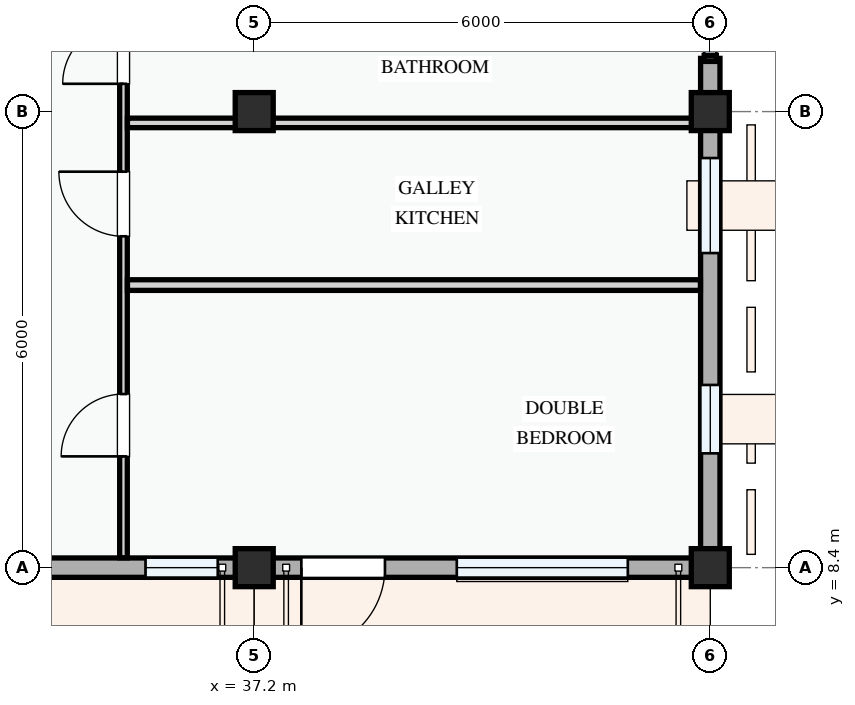
"""IFC4 building model, lengths in metres.
Left out: names, types, materials, properties, quantities, classifications, styles, units other than length and angle.
Written with IfcOpenShell. Run it as: python <this file> out.ifc"""

import sys

from ifc_helpers import new_model, si_unit, direction, frame, frame_2d, origin, origin_2d, place, context, subcontext, project, spatial, rectangle, extrude, element, fill, save


model = new_model("IFC4")
c1 = context("Model", 3, precision=1e-05, world=origin(), true_north=direction((0.0, 1.0)))
c2 = subcontext(c1, "Body", "Model", "MODEL_VIEW")
j1 = project(units=[si_unit("LENGTHUNIT", "METRE"), si_unit("PLANEANGLEUNIT", "RADIAN")], contexts=[c1])
p1 = place(None, origin())
s1 = spatial("IfcSite", under=j1, at=p1, CompositionType="ELEMENT")
p2 = place(p1, origin())
s2 = spatial("IfcBuilding", under=s1, at=p2, CompositionType="ELEMENT")
p3 = place(p2, frame((0.0, 0.0, 31.2)))
s3 = spatial("IfcBuildingStorey", under=s2, at=p3, CompositionType="ELEMENT", Elevation=31.2)
for number, where, z_axis, x_axis in (
    (1, (37.2, 8.4, 0.0), (0.0, 0.0, 1.0), (1.0, 0.0, 0.0)),
    (2, (37.2, 14.4, 0.0), (0.0, 0.0, 1.0), (1.0, 0.0, 0.0)),
    (3, (43.2, 8.4, 0.0), (0.0, 0.0, 1.0), (1.0, 0.0, 0.0)),
    (4, (43.2, 14.4, 0.0), (0.0, 0.0, 1.0), (1.0, 0.0, 0.0)),
):
    element("IfcColumn", number, at=place(p3, frame(where, z_axis=z_axis, x_axis=x_axis)), inside=s3, PredefinedType="COLUMN", context=c2, shape_type="SweptSolid", body=[
        extrude(rectangle(XDim=0.5, YDim=0.5, at=origin_2d()), origin(), (0.0, 0.0, 1.0), 3.3),
    ])
p4 = place(p3, frame((28.8, 8.4, 0.0), z_axis=(0.0, 0.0, 1.0), x_axis=(1.0, 0.0, 0.0)))
e5 = element("IfcWall", 5, at=p4, inside=s3, PredefinedType="STANDARD", context=c2, shape_type="SweptSolid", body=[
    extrude(rectangle(XDim=8.4, YDim=0.255, at=frame_2d((4.2, 0.0))), origin(), (0.0, 0.0, 1.0), 2.375),
])
p5 = place(p4, frame((2.15, 0.0, 0.0)))
e6 = element("IfcOpeningElement", 6, at=p5, cuts=e5, PredefinedType="OPENING", context=c2, shape_type="SweptSolid", body=[
    extrude(rectangle(XDim=1.05, YDim=2.15, at=frame_2d((0.525, 1.075))), frame((0.0, 0.137, 0.0), z_axis=(0.0, -1.0, 0.0), x_axis=(1.0, 0.0, 0.0)), (0.0, 0.0, 1.0), 0.275),
])
p6 = place(p4, frame((0.505, 0.0, 0.78)))
e7 = element("IfcOpeningElement", 7, at=p6, cuts=e5, PredefinedType="OPENING", context=c2, shape_type="SweptSolid", body=[
    extrude(rectangle(XDim=1.0, YDim=1.25, at=frame_2d((0.5, 0.625))), frame((0.0, 0.137, 0.0), z_axis=(0.0, -1.0, 0.0), x_axis=(1.0, 0.0, 0.0)), (0.0, 0.0, 1.0), 0.275),
])
p7 = place(p4, frame((4.265, 0.0, 0.78)))
e8 = element("IfcOpeningElement", 8, at=p7, cuts=e5, PredefinedType="OPENING", context=c2, shape_type="SweptSolid", body=[
    extrude(rectangle(XDim=1.4, YDim=1.45, at=frame_2d((0.7, 0.725))), frame((0.0, 0.137, 0.0), z_axis=(0.0, -1.0, 0.0), x_axis=(1.0, 0.0, 0.0)), (0.0, 0.0, 1.0), 0.275),
])
p8 = place(p4, frame((6.97, 0.0, 0.78)))
e9 = element("IfcOpeningElement", 9, at=p8, cuts=e5, PredefinedType="OPENING", context=c2, shape_type="SweptSolid", body=[
    extrude(rectangle(XDim=0.95, YDim=1.15, at=frame_2d((0.475, 0.575))), frame((0.0, 0.137, 0.0), z_axis=(0.0, -1.0, 0.0), x_axis=(1.0, 0.0, 0.0)), (0.0, 0.0, 1.0), 0.275),
])
p9 = place(p3, frame((37.2, 8.4, 0.0), z_axis=(0.0, 0.0, 1.0), x_axis=(1.0, 0.0, 0.0)))
e10 = element("IfcWall", 10, at=p9, inside=s3, PredefinedType="STANDARD", context=c2, shape_type="SweptSolid", body=[
    extrude(rectangle(XDim=6.0, YDim=0.255, at=frame_2d((3.0, 0.0))), origin(), (0.0, 0.0, 1.0), 2.525),
])
p10 = place(p9, frame((0.62, 0.0, 0.0)))
e11 = element("IfcOpeningElement", 11, at=p10, cuts=e10, PredefinedType="OPENING", context=c2, shape_type="SweptSolid", body=[
    extrude(rectangle(XDim=1.1, YDim=2.15, at=frame_2d((0.55, 1.075))), frame((0.0, 0.137, 0.0), z_axis=(0.0, -1.0, 0.0), x_axis=(1.0, 0.0, 0.0)), (0.0, 0.0, 1.0), 0.275),
])
p11 = place(p9, frame((2.665, 0.0, 0.78)))
e12 = element("IfcOpeningElement", 12, at=p11, cuts=e10, PredefinedType="OPENING", context=c2, shape_type="SweptSolid", body=[
    extrude(rectangle(XDim=2.25, YDim=1.6, at=frame_2d((1.125, 0.8))), frame((0.0, 0.137, 0.0), z_axis=(0.0, -1.0, 0.0), x_axis=(1.0, 0.0, 0.0)), (0.0, 0.0, 1.0), 0.275),
])
p12 = place(p3, frame((43.2, 8.4, 0.0), z_axis=(0.0, 0.0, 1.0), x_axis=(0.0, 1.0, 0.0)))
e13 = element("IfcWall", 13, at=p12, inside=s3, PredefinedType="STANDARD", context=c2, shape_type="SweptSolid", body=[
    extrude(rectangle(XDim=6.0, YDim=0.255, at=frame_2d((3.0, 0.0))), origin(), (0.0, 0.0, 1.0), 2.575),
])
p13 = place(p12, frame((1.504, 0.0, 0.78)))
e14 = element("IfcOpeningElement", 14, at=p13, cuts=e13, PredefinedType="OPENING", context=c2, shape_type="SweptSolid", body=[
    extrude(rectangle(XDim=0.9, YDim=1.2, at=frame_2d((0.45, 0.6))), frame((0.0, 0.137, 0.0), z_axis=(0.0, -1.0, 0.0), x_axis=(1.0, 0.0, 0.0)), (0.0, 0.0, 1.0), 0.275),
])
p14 = place(p12, frame((4.139, 0.0, 0.78)))
e15 = element("IfcOpeningElement", 15, at=p14, cuts=e13, PredefinedType="OPENING", context=c2, shape_type="SweptSolid", body=[
    extrude(rectangle(XDim=1.25, YDim=1.3, at=frame_2d((0.625, 0.65))), frame((0.0, 0.137, 0.0), z_axis=(0.0, -1.0, 0.0), x_axis=(1.0, 0.0, 0.0)), (0.0, 0.0, 1.0), 0.275),
])
p15 = place(p3, frame((43.2, 14.4, 0.0), z_axis=(0.0, 0.0, 1.0), x_axis=(0.0, 1.0, 0.0)))
e16 = element("IfcWall", 16, at=p15, inside=s3, PredefinedType="STANDARD", context=c2, shape_type="SweptSolid", body=[
    extrude(rectangle(XDim=0.7, YDim=0.255, at=frame_2d((0.35, 0.0))), origin(), (0.0, 0.0, 1.0), 2.425),
])
p16 = place(p3, frame((35.48, 8.53, 0.0), z_axis=(0.0, 0.0, 1.0), x_axis=(0.0, 1.0, 0.0)))
e17 = element("IfcWall", 17, at=p16, inside=s3, PredefinedType="PARTITIONING", context=c2, shape_type="SweptSolid", body=[
    extrude(rectangle(XDim=7.473, YDim=0.1, at=frame_2d((3.737, 0.0))), origin(), (0.0, 0.0, 1.0), 3.0),
])
p17 = place(p16, frame((1.334, 0.0, 0.0)))
e18 = element("IfcOpeningElement", 18, at=p17, cuts=e17, PredefinedType="OPENING", context=c2, shape_type="SweptSolid", body=[
    extrude(rectangle(XDim=0.82, YDim=2.08, at=frame_2d((0.41, 1.04))), frame((0.0, 0.06, 0.0), z_axis=(0.0, -1.0, 0.0), x_axis=(1.0, 0.0, 0.0)), (0.0, 0.0, 1.0), 0.12),
])
p18 = place(p16, frame((4.23, 0.0, 0.0)))
e19 = element("IfcOpeningElement", 19, at=p18, cuts=e17, PredefinedType="OPENING", context=c2, shape_type="SweptSolid", body=[
    extrude(rectangle(XDim=0.85, YDim=2.1, at=frame_2d((0.425, 1.05))), frame((0.0, 0.06, 0.0), z_axis=(0.0, -1.0, 0.0), x_axis=(1.0, 0.0, 0.0)), (0.0, 0.0, 1.0), 0.12),
])
p19 = place(p16, frame((6.236, 0.0, 0.0)))
e20 = element("IfcOpeningElement", 20, at=p19, cuts=e17, PredefinedType="OPENING", context=c2, shape_type="SweptSolid", body=[
    extrude(rectangle(XDim=0.8, YDim=2.1, at=frame_2d((0.4, 1.05))), frame((0.0, 0.06, 0.0), z_axis=(0.0, -1.0, 0.0), x_axis=(1.0, 0.0, 0.0)), (0.0, 0.0, 1.0), 0.12),
])
p20 = place(p3, frame((35.532, 12.118, 0.0), z_axis=(0.0, 0.0, 1.0), x_axis=(1.0, 0.0, 0.0)))
e21 = element("IfcWall", 21, at=p20, inside=s3, PredefinedType="PARTITIONING", context=c2, shape_type="SweptSolid", body=[
    extrude(rectangle(XDim=7.539, YDim=0.14, at=frame_2d((3.769, 0.0))), origin(), (0.0, 0.0, 1.0), 3.0),
])
p21 = place(p3, frame((35.532, 14.251, 0.0), z_axis=(0.0, 0.0, 1.0), x_axis=(1.0, 0.0, 0.0)))
e22 = element("IfcWall", 22, at=p21, inside=s3, PredefinedType="PARTITIONING", context=c2, shape_type="SweptSolid", body=[
    extrude(rectangle(XDim=7.539, YDim=0.125, at=frame_2d((3.769, 0.0))), origin(), (0.0, 0.0, 1.0), 2.375),
])
p22 = place(p8, origin())
e23 = element("IfcWindow", 23, at=p22, inside=s3, PartitioningType="SINGLE_PANEL", PredefinedType="WINDOW", context=c2, shape_type="SweptSolid", body=[
    extrude(rectangle(XDim=0.95, YDim=1.15, at=frame_2d((0.475, 0.575))), frame((0.0, 0.03, 0.0), z_axis=(0.0, -1.0, 0.0), x_axis=(1.0, 0.0, 0.0)), (0.0, 0.0, 1.0), 0.06),
])
fill(e9, e23)
p23 = place(p10, frame((1.1, 0.0, 0.0), z_axis=(0.0, 0.0, 1.0), x_axis=(-1.0, 0.0, 0.0)))
e24 = element("IfcDoor", 24, at=p23, inside=s3, OperationType="SINGLE_SWING_RIGHT", PredefinedType="DOOR", context=c2, shape_type="SweptSolid", body=[
    extrude(rectangle(XDim=1.1, YDim=2.15, at=frame_2d((0.55, 1.075))), frame((0.0, 0.025, 0.0), z_axis=(0.0, -1.0, 0.0), x_axis=(1.0, 0.0, 0.0)), (0.0, 0.0, 1.0), 0.05),
])
fill(e11, e24)
p24 = place(p11, origin())
e25 = element("IfcWindow", 25, at=p24, inside=s3, PartitioningType="DOUBLE_PANEL_VERTICAL", PredefinedType="WINDOW", context=c2, shape_type="SweptSolid", body=[
    extrude(rectangle(XDim=2.25, YDim=1.6, at=frame_2d((1.125, 0.8))), frame((0.0, 0.03, 0.0), z_axis=(0.0, -1.0, 0.0), x_axis=(1.0, 0.0, 0.0)), (0.0, 0.0, 1.0), 0.06),
])
fill(e12, e25)
p25 = place(p13, origin())
e26 = element("IfcWindow", 26, at=p25, inside=s3, PartitioningType="SINGLE_PANEL", PredefinedType="WINDOW", context=c2, shape_type="SweptSolid", body=[
    extrude(rectangle(XDim=0.9, YDim=1.2, at=frame_2d((0.45, 0.6))), frame((0.0, 0.03, 0.0), z_axis=(0.0, -1.0, 0.0), x_axis=(1.0, 0.0, 0.0)), (0.0, 0.0, 1.0), 0.06),
])
fill(e14, e26)
p26 = place(p14, origin())
e27 = element("IfcWindow", 27, at=p26, inside=s3, PartitioningType="SINGLE_PANEL", PredefinedType="WINDOW", context=c2, shape_type="SweptSolid", body=[
    extrude(rectangle(XDim=1.25, YDim=1.3, at=frame_2d((0.625, 0.65))), frame((0.0, 0.03, 0.0), z_axis=(0.0, -1.0, 0.0), x_axis=(1.0, 0.0, 0.0)), (0.0, 0.0, 1.0), 0.06),
])
fill(e15, e27)
p27 = place(p17, origin())
e28 = element("IfcDoor", 28, at=p27, inside=s3, OperationType="SINGLE_SWING_LEFT", PredefinedType="DOOR", context=c2, shape_type="SweptSolid", body=[
    extrude(rectangle(XDim=0.82, YDim=2.08, at=frame_2d((0.41, 1.04))), frame((0.0, 0.025, 0.0), z_axis=(0.0, -1.0, 0.0), x_axis=(1.0, 0.0, 0.0)), (0.0, 0.0, 1.0), 0.05),
])
fill(e18, e28)
p28 = place(p18, origin())
e29 = element("IfcDoor", 29, at=p28, inside=s3, OperationType="SINGLE_SWING_RIGHT", PredefinedType="DOOR", context=c2, shape_type="SweptSolid", body=[
    extrude(rectangle(XDim=0.85, YDim=2.1, at=frame_2d((0.425, 1.05))), frame((0.0, 0.025, 0.0), z_axis=(0.0, -1.0, 0.0), x_axis=(1.0, 0.0, 0.0)), (0.0, 0.0, 1.0), 0.05),
])
fill(e19, e29)
p29 = place(p19, origin())
e30 = element("IfcDoor", 30, at=p29, inside=s3, OperationType="SINGLE_SWING_LEFT", PredefinedType="DOOR", context=c2, shape_type="SweptSolid", body=[
    extrude(rectangle(XDim=0.8, YDim=2.1, at=frame_2d((0.4, 1.05))), frame((0.0, 0.025, 0.0), z_axis=(0.0, -1.0, 0.0), x_axis=(1.0, 0.0, 0.0)), (0.0, 0.0, 1.0), 0.05),
])
fill(e20, e30)
save(model, sys.argv[1])
